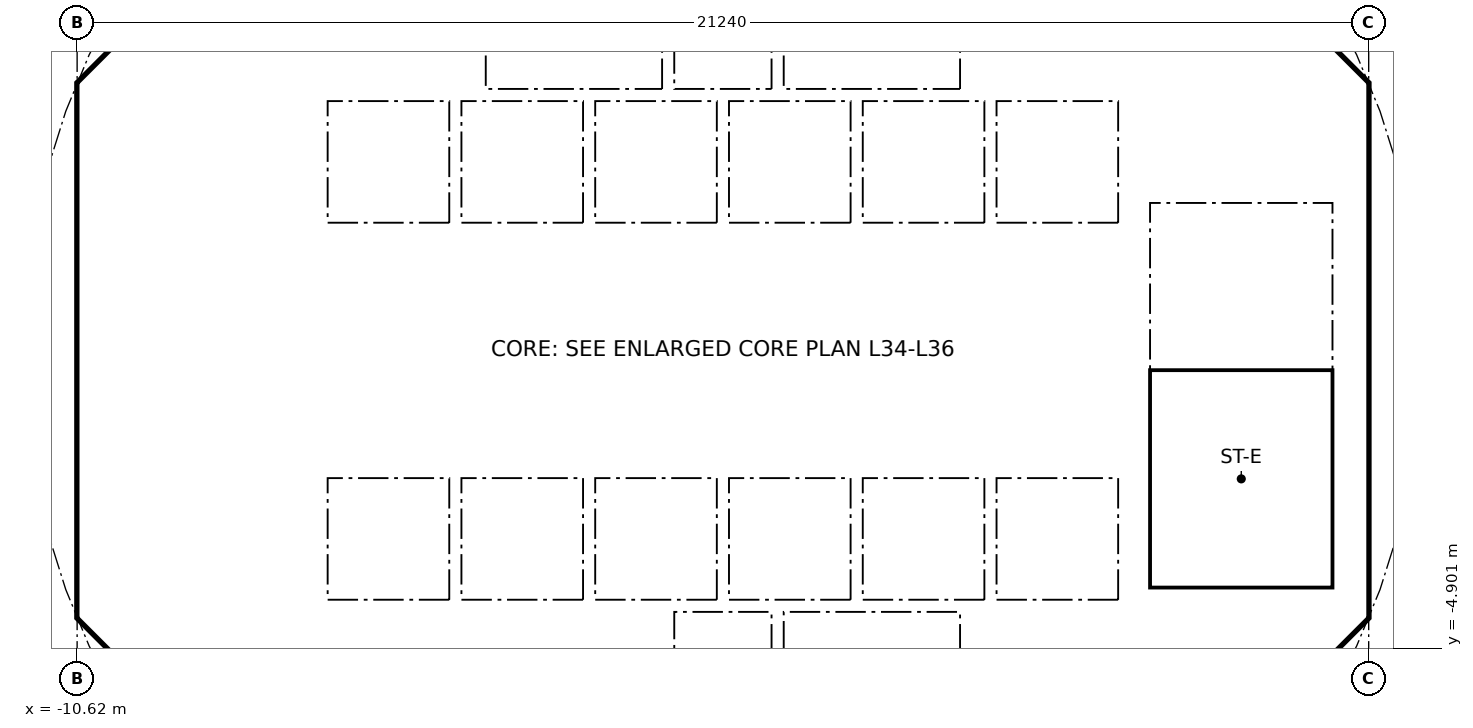
"""IFC4 building model, lengths in metres.
Left out: names, types, materials, properties, quantities, classifications, styles, units other than length and angle.
Written with IfcOpenShell. Run it as: python <this file> out.ifc"""

import sys

from ifc_helpers import new_model, si_unit, direction, frame, frame_2d, origin, place, context, subcontext, project, spatial, polyline, rectangle, outline, extrude, element, fill, save


model = new_model("IFC4")
c1 = context("Model", 3, precision=1e-05, world=origin(), true_north=direction((0.0, 1.0)))
c2 = subcontext(c1, "Body", "Model", "MODEL_VIEW")
j1 = project(units=[si_unit("LENGTHUNIT", "METRE"), si_unit("PLANEANGLEUNIT", "RADIAN")], contexts=[c1])
p1 = place(None, origin())
s1 = spatial("IfcSite", under=j1, at=p1, CompositionType="ELEMENT")
p2 = place(p1, origin())
s2 = spatial("IfcBuilding", under=s1, at=p2, CompositionType="ELEMENT")
p3 = place(p2, frame((0.0, 0.0, 138.1)))
s3 = spatial("IfcBuildingStorey", under=s2, at=p3, CompositionType="ELEMENT", Elevation=138.1)
p4 = place(p3, frame((9.988, 4.613, 0.0), z_axis=(0.0, 0.0, 1.0), x_axis=(-0.707106781187, 0.707106781187, 0.0)))
e1 = element("IfcWall", 1, at=p4, inside=s3, PredefinedType="SHEAR", context=c2, shape_type="SweptSolid", body=[
    extrude(rectangle(XDim=7.602, YDim=0.6, at=frame_2d((3.801, 0.0))), origin(), (0.0, 0.0, 1.0), 3.44),
])
p5 = place(p4, frame((3.201, 0.0, 0.0)))
e2 = element("IfcOpeningElement", 2, at=p5, cuts=e1, PredefinedType="OPENING", context=c2, shape_type="SweptSolid", body=[
    extrude(rectangle(XDim=1.2, YDim=2.1, at=frame_2d((0.6, 1.05))), frame((0.0, 0.31, 0.0), z_axis=(0.0, -1.0, 0.0), x_axis=(1.0, 0.0, 0.0)), (0.0, 0.0, 1.0), 0.62),
])
p6 = place(p3, frame((-4.613, 9.988, 0.0), z_axis=(0.0, 0.0, 1.0), x_axis=(-0.707106781187, -0.707106781187, 0.0)))
e3 = element("IfcWall", 3, at=p6, inside=s3, PredefinedType="SHEAR", context=c2, shape_type="SweptSolid", body=[
    extrude(rectangle(XDim=7.602, YDim=0.6, at=frame_2d((3.801, 0.0))), origin(), (0.0, 0.0, 1.0), 3.44),
])
p7 = place(p6, frame((0.351, 0.0, 0.0)))
e4 = element("IfcOpeningElement", 4, at=p7, cuts=e3, PredefinedType="OPENING", context=c2, shape_type="SweptSolid", body=[
    extrude(rectangle(XDim=1.1, YDim=2.1, at=frame_2d((0.55, 1.05))), frame((0.0, 0.31, 0.0), z_axis=(0.0, -1.0, 0.0), x_axis=(1.0, 0.0, 0.0)), (0.0, 0.0, 1.0), 0.62),
])
p8 = place(p3, frame((-10.325, 3.801, 0.0), z_axis=(0.0, 0.0, 1.0), x_axis=(0.0, -1.0, 0.0)))
e5 = element("IfcWall", 5, at=p8, inside=s3, PredefinedType="SHEAR", context=c2, shape_type="SweptSolid", body=[
    extrude(rectangle(XDim=7.602, YDim=0.6, at=frame_2d((3.801, 0.0))), origin(), (0.0, 0.0, 1.0), 3.44),
])
p9 = place(p8, frame((0.651, 0.0, 0.0)))
e6 = element("IfcOpeningElement", 6, at=p9, cuts=e5, PredefinedType="OPENING", context=c2, shape_type="SweptSolid", body=[
    extrude(rectangle(XDim=1.5, YDim=2.1, at=frame_2d((0.75, 1.05))), frame((0.0, 0.31, 0.0), z_axis=(0.0, -1.0, 0.0), x_axis=(1.0, 0.0, 0.0)), (0.0, 0.0, 1.0), 0.62),
])
p10 = place(p8, frame((5.451, 0.0, 0.0)))
e7 = element("IfcOpeningElement", 7, at=p10, cuts=e5, PredefinedType="OPENING", context=c2, shape_type="SweptSolid", body=[
    extrude(rectangle(XDim=1.5, YDim=2.1, at=frame_2d((0.75, 1.05))), frame((0.0, 0.31, 0.0), z_axis=(0.0, -1.0, 0.0), x_axis=(1.0, 0.0, 0.0)), (0.0, 0.0, 1.0), 0.62),
])
p11 = place(p3, frame((-9.988, -4.613, 0.0), z_axis=(0.0, 0.0, 1.0), x_axis=(0.707106781187, -0.707106781187, 0.0)))
e8 = element("IfcWall", 8, at=p11, inside=s3, PredefinedType="SHEAR", context=c2, shape_type="SweptSolid", body=[
    extrude(rectangle(XDim=7.602, YDim=0.6, at=frame_2d((3.801, 0.0))), origin(), (0.0, 0.0, 1.0), 3.44),
])
p12 = place(p11, frame((6.151, 0.0, 0.0)))
e9 = element("IfcOpeningElement", 9, at=p12, cuts=e8, PredefinedType="OPENING", context=c2, shape_type="SweptSolid", body=[
    extrude(rectangle(XDim=1.1, YDim=2.1, at=frame_2d((0.55, 1.05))), frame((0.0, 0.31, 0.0), z_axis=(0.0, -1.0, 0.0), x_axis=(1.0, 0.0, 0.0)), (0.0, 0.0, 1.0), 0.62),
])
p13 = place(p3, frame((4.613, -9.988, 0.0), z_axis=(0.0, 0.0, 1.0), x_axis=(0.707106781187, 0.707106781187, 0.0)))
e10 = element("IfcWall", 10, at=p13, inside=s3, PredefinedType="SHEAR", context=c2, shape_type="SweptSolid", body=[
    extrude(rectangle(XDim=7.602, YDim=0.6, at=frame_2d((3.801, 0.0))), origin(), (0.0, 0.0, 1.0), 3.44),
])
p14 = place(p13, frame((3.201, 0.0, 0.0)))
e11 = element("IfcOpeningElement", 11, at=p14, cuts=e10, PredefinedType="OPENING", context=c2, shape_type="SweptSolid", body=[
    extrude(rectangle(XDim=1.2, YDim=2.1, at=frame_2d((0.6, 1.05))), frame((0.0, 0.31, 0.0), z_axis=(0.0, -1.0, 0.0), x_axis=(1.0, 0.0, 0.0)), (0.0, 0.0, 1.0), 0.62),
])
p15 = place(p3, frame((-5.8, 4.3, 0.0), z_axis=(0.0, 0.0, 1.0), x_axis=(0.0, 1.0, 0.0)))
e12 = element("IfcWall", 12, at=p15, inside=s3, PredefinedType="PARTITIONING", context=c2, shape_type="SweptSolid", body=[
    extrude(rectangle(XDim=3.927, YDim=0.15, at=frame_2d((1.963, 0.0))), origin(), (0.0, 0.0, 1.0), 3.44),
])
p16 = place(p15, frame((0.413, 0.0, 0.0)))
e13 = element("IfcOpeningElement", 13, at=p16, cuts=e12, PredefinedType="OPENING", context=c2, shape_type="SweptSolid", body=[
    extrude(rectangle(XDim=0.9, YDim=2.1, at=frame_2d((0.45, 1.05))), frame((0.0, 0.085, 0.0), z_axis=(0.0, -1.0, 0.0), x_axis=(1.0, 0.0, 0.0)), (0.0, 0.0, 1.0), 0.17),
])
p17 = place(p15, frame((2.489, 0.0, 0.0)))
e14 = element("IfcOpeningElement", 14, at=p17, cuts=e12, PredefinedType="OPENING", context=c2, shape_type="SweptSolid", body=[
    extrude(rectangle(XDim=0.9, YDim=2.1, at=frame_2d((0.45, 1.05))), frame((0.0, 0.085, 0.0), z_axis=(0.0, -1.0, 0.0), x_axis=(1.0, 0.0, 0.0)), (0.0, 0.0, 1.0), 0.17),
])
p18 = place(p3, frame((4.0, 4.3, 0.0), z_axis=(0.0, 0.0, 1.0), x_axis=(0.0, 1.0, 0.0)))
e15 = element("IfcWall", 15, at=p18, inside=s3, PredefinedType="SOLIDWALL", context=c2, shape_type="SweptSolid", body=[
    extrude(rectangle(XDim=2.2, YDim=0.2, at=frame_2d((1.1, 0.0))), origin(), (0.0, 0.0, 1.0), 3.44),
])
p19 = place(p18, frame((0.55, 0.0, 0.0)))
e16 = element("IfcOpeningElement", 16, at=p19, cuts=e15, PredefinedType="OPENING", context=c2, shape_type="SweptSolid", body=[
    extrude(rectangle(XDim=1.1, YDim=2.1, at=frame_2d((0.55, 1.05))), frame((0.0, 0.11, 0.0), z_axis=(0.0, -1.0, 0.0), x_axis=(1.0, 0.0, 0.0)), (0.0, 0.0, 1.0), 0.22),
])
p20 = place(p3, frame((-4.0, 4.3, 0.0), z_axis=(0.0, 0.0, 1.0), x_axis=(0.0, 1.0, 0.0)))
e17 = element("IfcWall", 17, at=p20, inside=s3, PredefinedType="SOLIDWALL", context=c2, shape_type="SweptSolid", body=[
    extrude(rectangle(XDim=2.2, YDim=0.2, at=frame_2d((1.1, 0.0))), origin(), (0.0, 0.0, 1.0), 3.44),
])
p21 = place(p20, frame((0.55, 0.0, 0.0)))
e18 = element("IfcOpeningElement", 18, at=p21, cuts=e17, PredefinedType="OPENING", context=c2, shape_type="SweptSolid", body=[
    extrude(rectangle(XDim=1.1, YDim=2.1, at=frame_2d((0.55, 1.05))), frame((0.0, 0.11, 0.0), z_axis=(0.0, -1.0, 0.0), x_axis=(1.0, 0.0, 0.0)), (0.0, 0.0, 1.0), 0.22),
])
p22 = place(p3, frame((-6.7, 2.0, 0.0), z_axis=(0.0, 0.0, 1.0), x_axis=(1.0, 0.0, 0.0)))
e19 = element("IfcWall", 19, at=p22, inside=s3, PredefinedType="SOLIDWALL", context=c2, shape_type="SweptSolid", body=[
    extrude(rectangle(XDim=13.4, YDim=0.2, at=frame_2d((6.7, 0.0))), origin(), (0.0, 0.0, 1.0), 3.44),
])
p23 = place(p22, frame((0.65, 0.0, 0.0)))
e20 = element("IfcOpeningElement", 20, at=p23, cuts=e19, PredefinedType="OPENING", context=c2, shape_type="SweptSolid", body=[
    extrude(rectangle(XDim=1.1, YDim=2.1, at=frame_2d((0.55, 1.05))), frame((0.0, 0.11, 0.0), z_axis=(0.0, -1.0, 0.0), x_axis=(1.0, 0.0, 0.0)), (0.0, 0.0, 1.0), 0.22),
])
p24 = place(p22, frame((2.85, 0.0, 0.0)))
e21 = element("IfcOpeningElement", 21, at=p24, cuts=e19, PredefinedType="OPENING", context=c2, shape_type="SweptSolid", body=[
    extrude(rectangle(XDim=1.1, YDim=2.1, at=frame_2d((0.55, 1.05))), frame((0.0, 0.11, 0.0), z_axis=(0.0, -1.0, 0.0), x_axis=(1.0, 0.0, 0.0)), (0.0, 0.0, 1.0), 0.22),
])
p25 = place(p22, frame((5.05, 0.0, 0.0)))
e22 = element("IfcOpeningElement", 22, at=p25, cuts=e19, PredefinedType="OPENING", context=c2, shape_type="SweptSolid", body=[
    extrude(rectangle(XDim=1.1, YDim=2.1, at=frame_2d((0.55, 1.05))), frame((0.0, 0.11, 0.0), z_axis=(0.0, -1.0, 0.0), x_axis=(1.0, 0.0, 0.0)), (0.0, 0.0, 1.0), 0.22),
])
p26 = place(p3, frame((6.7, 4.0, 0.0), z_axis=(0.0, 0.0, 1.0), x_axis=(1.0, 0.0, 0.0)))
e23 = element("IfcWall", 23, at=p26, inside=s3, PredefinedType="SOLIDWALL", context=c2, shape_type="SweptSolid", body=[
    extrude(rectangle(XDim=3.325, YDim=0.2, at=frame_2d((1.662, 0.0))), origin(), (0.0, 0.0, 1.0), 3.44),
])
p27 = place(p26, frame((1.25, 0.0, 0.0)))
e24 = element("IfcOpeningElement", 24, at=p27, cuts=e23, PredefinedType="OPENING", context=c2, shape_type="SweptSolid", body=[
    extrude(rectangle(XDim=1.1, YDim=2.1, at=frame_2d((0.55, 1.05))), frame((0.0, 0.11, 0.0), z_axis=(0.0, -1.0, 0.0), x_axis=(1.0, 0.0, 0.0)), (0.0, 0.0, 1.0), 0.22),
])
p28 = place(p3, frame((-7.0, -7.027, 0.0), z_axis=(0.0, 0.0, 1.0), x_axis=(0.0, 1.0, 0.0)))
e25 = element("IfcWall", 25, at=p28, inside=s3, PredefinedType="PARTITIONING", context=c2, shape_type="SweptSolid", body=[
    extrude(rectangle(XDim=2.927, YDim=0.15, at=frame_2d((1.463, 0.0))), origin(), (0.0, 0.0, 1.0), 3.44),
])
p29 = place(p28, frame((0.976, 0.0, 0.0)))
e26 = element("IfcOpeningElement", 26, at=p29, cuts=e25, PredefinedType="OPENING", context=c2, shape_type="SweptSolid", body=[
    extrude(rectangle(XDim=0.9, YDim=2.1, at=frame_2d((0.45, 1.05))), frame((0.0, 0.085, 0.0), z_axis=(0.0, -1.0, 0.0), x_axis=(1.0, 0.0, 0.0)), (0.0, 0.0, 1.0), 0.17),
])
p30 = place(p3, frame((4.0, -6.5, 0.0), z_axis=(0.0, 0.0, 1.0), x_axis=(0.0, 1.0, 0.0)))
e27 = element("IfcWall", 27, at=p30, inside=s3, PredefinedType="SOLIDWALL", context=c2, shape_type="SweptSolid", body=[
    extrude(rectangle(XDim=2.2, YDim=0.2, at=frame_2d((1.1, 0.0))), origin(), (0.0, 0.0, 1.0), 3.44),
])
p31 = place(p30, frame((0.55, 0.0, 0.0)))
e28 = element("IfcOpeningElement", 28, at=p31, cuts=e27, PredefinedType="OPENING", context=c2, shape_type="SweptSolid", body=[
    extrude(rectangle(XDim=1.1, YDim=2.1, at=frame_2d((0.55, 1.05))), frame((0.0, 0.11, 0.0), z_axis=(0.0, -1.0, 0.0), x_axis=(1.0, 0.0, 0.0)), (0.0, 0.0, 1.0), 0.22),
])
p32 = place(p3, frame((-4.0, -6.5, 0.0), z_axis=(0.0, 0.0, 1.0), x_axis=(0.0, 1.0, 0.0)))
e29 = element("IfcWall", 29, at=p32, inside=s3, PredefinedType="SOLIDWALL", context=c2, shape_type="SweptSolid", body=[
    extrude(rectangle(XDim=2.2, YDim=0.2, at=frame_2d((1.1, 0.0))), origin(), (0.0, 0.0, 1.0), 3.44),
])
p33 = place(p32, frame((0.65, 0.0, 0.0)))
e30 = element("IfcOpeningElement", 30, at=p33, cuts=e29, PredefinedType="OPENING", context=c2, shape_type="SweptSolid", body=[
    extrude(rectangle(XDim=0.9, YDim=2.1, at=frame_2d((0.45, 1.05))), frame((0.0, 0.11, 0.0), z_axis=(0.0, -1.0, 0.0), x_axis=(1.0, 0.0, 0.0)), (0.0, 0.0, 1.0), 0.22),
])
p34 = place(p3, frame((-6.7, -2.0, 0.0), z_axis=(0.0, 0.0, 1.0), x_axis=(1.0, 0.0, 0.0)))
e31 = element("IfcWall", 31, at=p34, inside=s3, PredefinedType="SOLIDWALL", context=c2, shape_type="SweptSolid", body=[
    extrude(rectangle(XDim=13.4, YDim=0.2, at=frame_2d((6.7, 0.0))), origin(), (0.0, 0.0, 1.0), 3.44),
])
p35 = place(p34, frame((0.65, 0.0, 0.0)))
e32 = element("IfcOpeningElement", 32, at=p35, cuts=e31, PredefinedType="OPENING", context=c2, shape_type="SweptSolid", body=[
    extrude(rectangle(XDim=1.1, YDim=2.1, at=frame_2d((0.55, 1.05))), frame((0.0, 0.11, 0.0), z_axis=(0.0, -1.0, 0.0), x_axis=(1.0, 0.0, 0.0)), (0.0, 0.0, 1.0), 0.22),
])
p36 = place(p34, frame((2.85, 0.0, 0.0)))
e33 = element("IfcOpeningElement", 33, at=p36, cuts=e31, PredefinedType="OPENING", context=c2, shape_type="SweptSolid", body=[
    extrude(rectangle(XDim=1.1, YDim=2.1, at=frame_2d((0.55, 1.05))), frame((0.0, 0.11, 0.0), z_axis=(0.0, -1.0, 0.0), x_axis=(1.0, 0.0, 0.0)), (0.0, 0.0, 1.0), 0.22),
])
p37 = place(p3, origin())
e34 = element("IfcWall", 34, at=p37, inside=s3, PredefinedType="SHEAR", context=c2, shape_type="SweptSolid", body=[
    extrude(outline(polyline([(-10.625, -3.801), (-10.025, -3.801), (-10.025, -4.152), (-9.776, -4.401), (-10.2, -4.825), (-10.625, -4.401), (-10.625, -3.801)])), origin(), (0.0, 0.0, 1.0), 3.44),
])
p38 = place(p3, origin())
e35 = element("IfcWall", 35, at=p38, inside=s3, PredefinedType="SHEAR", context=c2, shape_type="SweptSolid", body=[
    extrude(outline(polyline([(-10.2, 4.825), (-9.776, 4.401), (-10.025, 4.152), (-10.025, 3.801), (-10.625, 3.801), (-10.625, 4.401), (-10.2, 4.825)])), origin(), (0.0, 0.0, 1.0), 3.44),
])
p39 = place(p3, origin())
e36 = element("IfcWall", 36, at=p39, inside=s3, PredefinedType="SHEAR", context=c2, shape_type="SweptSolid", body=[
    extrude(outline(polyline([(9.776, -4.401), (10.025, -4.152), (10.025, -3.801), (10.025, 4.152), (9.776, 4.401), (10.2, 4.825), (10.625, 4.401), (10.625, -4.401), (10.2, -4.825), (9.776, -4.401)])), origin(), (0.0, 0.0, 1.0), 3.44),
])
for number, where, z_axis, x_axis in (
    (37, (-10.025, -4.0, 0.0), (0.0, 0.0, 1.0), (1.0, 0.0, 0.0)),
    (38, (-10.025, 4.0, 0.0), (0.0, 0.0, 1.0), (1.0, 0.0, 0.0)),
):
    element("IfcWall", number, at=place(p3, frame(where, z_axis=z_axis, x_axis=x_axis)), inside=s3, PredefinedType="PARTITIONING", context=c2, shape_type="SweptSolid", body=[
        extrude(rectangle(XDim=3.325, YDim=0.2, at=frame_2d((1.662, 0.0))), origin(), (0.0, 0.0, 1.0), 3.44),
    ])
for number, where, z_axis, x_axis in (
    (39, (-0.9, -6.5, 0.0), (0.0, 0.0, 1.0), (0.0, 1.0, 0.0)),
    (40, (0.9, -6.5, 0.0), (0.0, 0.0, 1.0), (0.0, 1.0, 0.0)),
):
    element("IfcWall", number, at=place(p3, frame(where, z_axis=z_axis, x_axis=x_axis)), inside=s3, PredefinedType="SOLIDWALL", context=c2, shape_type="SweptSolid", body=[
        extrude(rectangle(XDim=2.2, YDim=0.2, at=frame_2d((1.1, 0.0))), origin(), (0.0, 0.0, 1.0), 3.44),
    ])
p40 = place(p3, origin())
e41 = element("IfcWall", 41, at=p40, inside=s3, PredefinedType="SOLIDWALL", context=c2, shape_type="SweptSolid", body=[
    extrude(outline(polyline([(-6.7, -2.1), (-6.5, -2.1), (-6.5, -4.1), (-4.5, -4.1), (-4.5, -2.1), (-4.3, -2.1), (-4.3, -4.1), (-2.3, -4.1), (-2.3, -2.1), (-2.1, -2.1), (-2.1, -4.1), (-0.1, -4.1), (-0.1, -2.1), (0.1, -2.1), (0.1, -4.1), (2.1, -4.1), (2.1, -2.1), (2.3, -2.1), (2.3, -4.1), (4.3, -4.1), (4.3, -2.1), (4.5, -2.1), (4.5, -4.1), (6.5, -4.1), (6.5, -2.1), (6.7, -2.1), (6.7, -4.3), (-6.7, -4.3), (-6.7, -2.1)])), origin(), (0.0, 0.0, 1.0), 3.44),
])
for number, where, z_axis, x_axis in (
    (42, (-0.9, 4.3, 0.0), (0.0, 0.0, 1.0), (0.0, 1.0, 0.0)),
    (43, (0.9, 4.3, 0.0), (0.0, 0.0, 1.0), (0.0, 1.0, 0.0)),
):
    element("IfcWall", number, at=place(p3, frame(where, z_axis=z_axis, x_axis=x_axis)), inside=s3, PredefinedType="SOLIDWALL", context=c2, shape_type="SweptSolid", body=[
        extrude(rectangle(XDim=2.2, YDim=0.2, at=frame_2d((1.1, 0.0))), origin(), (0.0, 0.0, 1.0), 3.44),
    ])
p41 = place(p3, origin())
e44 = element("IfcWall", 44, at=p41, inside=s3, PredefinedType="SOLIDWALL", context=c2, shape_type="SweptSolid", body=[
    extrude(outline(polyline([(-6.5, 2.1), (-6.7, 2.1), (-6.7, 4.3), (6.7, 4.3), (6.7, 2.1), (6.5, 2.1), (6.5, 4.1), (4.5, 4.1), (4.5, 2.1), (4.3, 2.1), (4.3, 4.1), (2.3, 4.1), (2.3, 2.1), (2.1, 2.1), (2.1, 4.1), (0.1, 4.1), (0.1, 2.1), (-0.1, 2.1), (-0.1, 4.1), (-2.1, 4.1), (-2.1, 2.1), (-2.3, 2.1), (-2.3, 4.1), (-4.3, 4.1), (-4.3, 2.1), (-4.5, 2.1), (-4.5, 4.1), (-6.5, 4.1), (-6.5, 2.1)])), origin(), (0.0, 0.0, 1.0), 3.44),
])
p42 = place(p3, origin())
e45 = element("IfcWall", 45, at=p42, inside=s3, PredefinedType="SOLIDWALL", context=c2, shape_type="SweptSolid", body=[
    extrude(outline(polyline([(7.025, -3.9), (6.7, -3.9), (6.7, 3.9), (7.025, 3.9), (7.025, -3.9)])), origin(), (0.0, 0.0, 1.0), 3.44),
])
p43 = place(p3, origin())
e46 = element("IfcWall", 46, at=p43, inside=s3, PredefinedType="SOLIDWALL", context=c2, shape_type="SweptSolid", body=[
    extrude(outline(polyline([(10.025, -4.1), (6.7, -4.1), (6.7, -3.9), (10.025, -3.9), (10.025, -4.1)])), origin(), (0.0, 0.0, 1.0), 3.44),
])
p44 = place(p23, origin())
e47 = element("IfcDoor", 47, at=p44, inside=s3, OperationType="DOUBLE_DOOR_SLIDING", PredefinedType="DOOR", context=c2, shape_type="SweptSolid", body=[
    extrude(rectangle(XDim=1.1, YDim=2.1, at=frame_2d((0.55, 1.05))), frame((0.0, 0.025, 0.0), z_axis=(0.0, -1.0, 0.0), x_axis=(1.0, 0.0, 0.0)), (0.0, 0.0, 1.0), 0.05),
])
fill(e20, e47)
p45 = place(p24, origin())
e48 = element("IfcDoor", 48, at=p45, inside=s3, OperationType="DOUBLE_DOOR_SLIDING", PredefinedType="DOOR", context=c2, shape_type="SweptSolid", body=[
    extrude(rectangle(XDim=1.1, YDim=2.1, at=frame_2d((0.55, 1.05))), frame((0.0, 0.025, 0.0), z_axis=(0.0, -1.0, 0.0), x_axis=(1.0, 0.0, 0.0)), (0.0, 0.0, 1.0), 0.05),
])
fill(e21, e48)
p46 = place(p25, origin())
e49 = element("IfcDoor", 49, at=p46, inside=s3, OperationType="DOUBLE_DOOR_SLIDING", PredefinedType="DOOR", context=c2, shape_type="SweptSolid", body=[
    extrude(rectangle(XDim=1.1, YDim=2.1, at=frame_2d((0.55, 1.05))), frame((0.0, 0.025, 0.0), z_axis=(0.0, -1.0, 0.0), x_axis=(1.0, 0.0, 0.0)), (0.0, 0.0, 1.0), 0.05),
])
fill(e22, e49)
p47 = place(p35, origin())
e50 = element("IfcDoor", 50, at=p47, inside=s3, OperationType="DOUBLE_DOOR_SLIDING", PredefinedType="DOOR", context=c2, shape_type="SweptSolid", body=[
    extrude(rectangle(XDim=1.1, YDim=2.1, at=frame_2d((0.55, 1.05))), frame((0.0, 0.025, 0.0), z_axis=(0.0, -1.0, 0.0), x_axis=(1.0, 0.0, 0.0)), (0.0, 0.0, 1.0), 0.05),
])
fill(e32, e50)
p48 = place(p36, origin())
e51 = element("IfcDoor", 51, at=p48, inside=s3, OperationType="DOUBLE_DOOR_SLIDING", PredefinedType="DOOR", context=c2, shape_type="SweptSolid", body=[
    extrude(rectangle(XDim=1.1, YDim=2.1, at=frame_2d((0.55, 1.05))), frame((0.0, 0.025, 0.0), z_axis=(0.0, -1.0, 0.0), x_axis=(1.0, 0.0, 0.0)), (0.0, 0.0, 1.0), 0.05),
])
fill(e33, e51)
p49 = place(p19, origin())
e52 = element("IfcDoor", 52, at=p49, inside=s3, OperationType="DOUBLE_DOOR_SLIDING", PredefinedType="DOOR", context=c2, shape_type="SweptSolid", body=[
    extrude(rectangle(XDim=1.1, YDim=2.1, at=frame_2d((0.55, 1.05))), frame((0.0, 0.025, 0.0), z_axis=(0.0, -1.0, 0.0), x_axis=(1.0, 0.0, 0.0)), (0.0, 0.0, 1.0), 0.05),
])
fill(e16, e52)
p50 = place(p31, origin())
e53 = element("IfcDoor", 53, at=p50, inside=s3, OperationType="DOUBLE_DOOR_SLIDING", PredefinedType="DOOR", context=c2, shape_type="SweptSolid", body=[
    extrude(rectangle(XDim=1.1, YDim=2.1, at=frame_2d((0.55, 1.05))), frame((0.0, 0.025, 0.0), z_axis=(0.0, -1.0, 0.0), x_axis=(1.0, 0.0, 0.0)), (0.0, 0.0, 1.0), 0.05),
])
fill(e28, e53)
p51 = place(p21, origin())
e54 = element("IfcDoor", 54, at=p51, inside=s3, OperationType="DOUBLE_DOOR_SLIDING", PredefinedType="DOOR", context=c2, shape_type="SweptSolid", body=[
    extrude(rectangle(XDim=1.1, YDim=2.1, at=frame_2d((0.55, 1.05))), frame((0.0, 0.025, 0.0), z_axis=(0.0, -1.0, 0.0), x_axis=(1.0, 0.0, 0.0)), (0.0, 0.0, 1.0), 0.05),
])
fill(e18, e54)
p52 = place(p27, frame((1.1, 0.0, 0.0), x_axis=(-1.0, 0.0, 0.0)))
e55 = element("IfcDoor", 55, at=p52, inside=s3, OperationType="SINGLE_SWING_LEFT", PredefinedType="DOOR", context=c2, shape_type="SweptSolid", body=[
    extrude(rectangle(XDim=1.1, YDim=2.1, at=frame_2d((0.55, 1.05))), frame((0.0, 0.025, 0.0), z_axis=(0.0, -1.0, 0.0), x_axis=(1.0, 0.0, 0.0)), (0.0, 0.0, 1.0), 0.05),
])
fill(e24, e55)
p53 = place(p16, origin())
e56 = element("IfcDoor", 56, at=p53, inside=s3, OperationType="SINGLE_SWING_LEFT", PredefinedType="DOOR", context=c2, shape_type="SweptSolid", body=[
    extrude(rectangle(XDim=0.9, YDim=2.1, at=frame_2d((0.45, 1.05))), frame((0.0, 0.025, 0.0), z_axis=(0.0, -1.0, 0.0), x_axis=(1.0, 0.0, 0.0)), (0.0, 0.0, 1.0), 0.05),
])
fill(e13, e56)
p54 = place(p9, origin())
e57 = element("IfcDoor", 57, at=p54, inside=s3, OperationType="DOUBLE_DOOR_SINGLE_SWING", PredefinedType="DOOR", context=c2, shape_type="SweptSolid", body=[
    extrude(rectangle(XDim=1.5, YDim=2.1, at=frame_2d((0.75, 1.05))), frame((0.0, 0.025, 0.0), z_axis=(0.0, -1.0, 0.0), x_axis=(1.0, 0.0, 0.0)), (0.0, 0.0, 1.0), 0.05),
])
fill(e6, e57)
p55 = place(p10, origin())
e58 = element("IfcDoor", 58, at=p55, inside=s3, OperationType="DOUBLE_DOOR_SINGLE_SWING", PredefinedType="DOOR", context=c2, shape_type="SweptSolid", body=[
    extrude(rectangle(XDim=1.5, YDim=2.1, at=frame_2d((0.75, 1.05))), frame((0.0, 0.025, 0.0), z_axis=(0.0, -1.0, 0.0), x_axis=(1.0, 0.0, 0.0)), (0.0, 0.0, 1.0), 0.05),
])
fill(e7, e58)
save(model, sys.argv[1])
